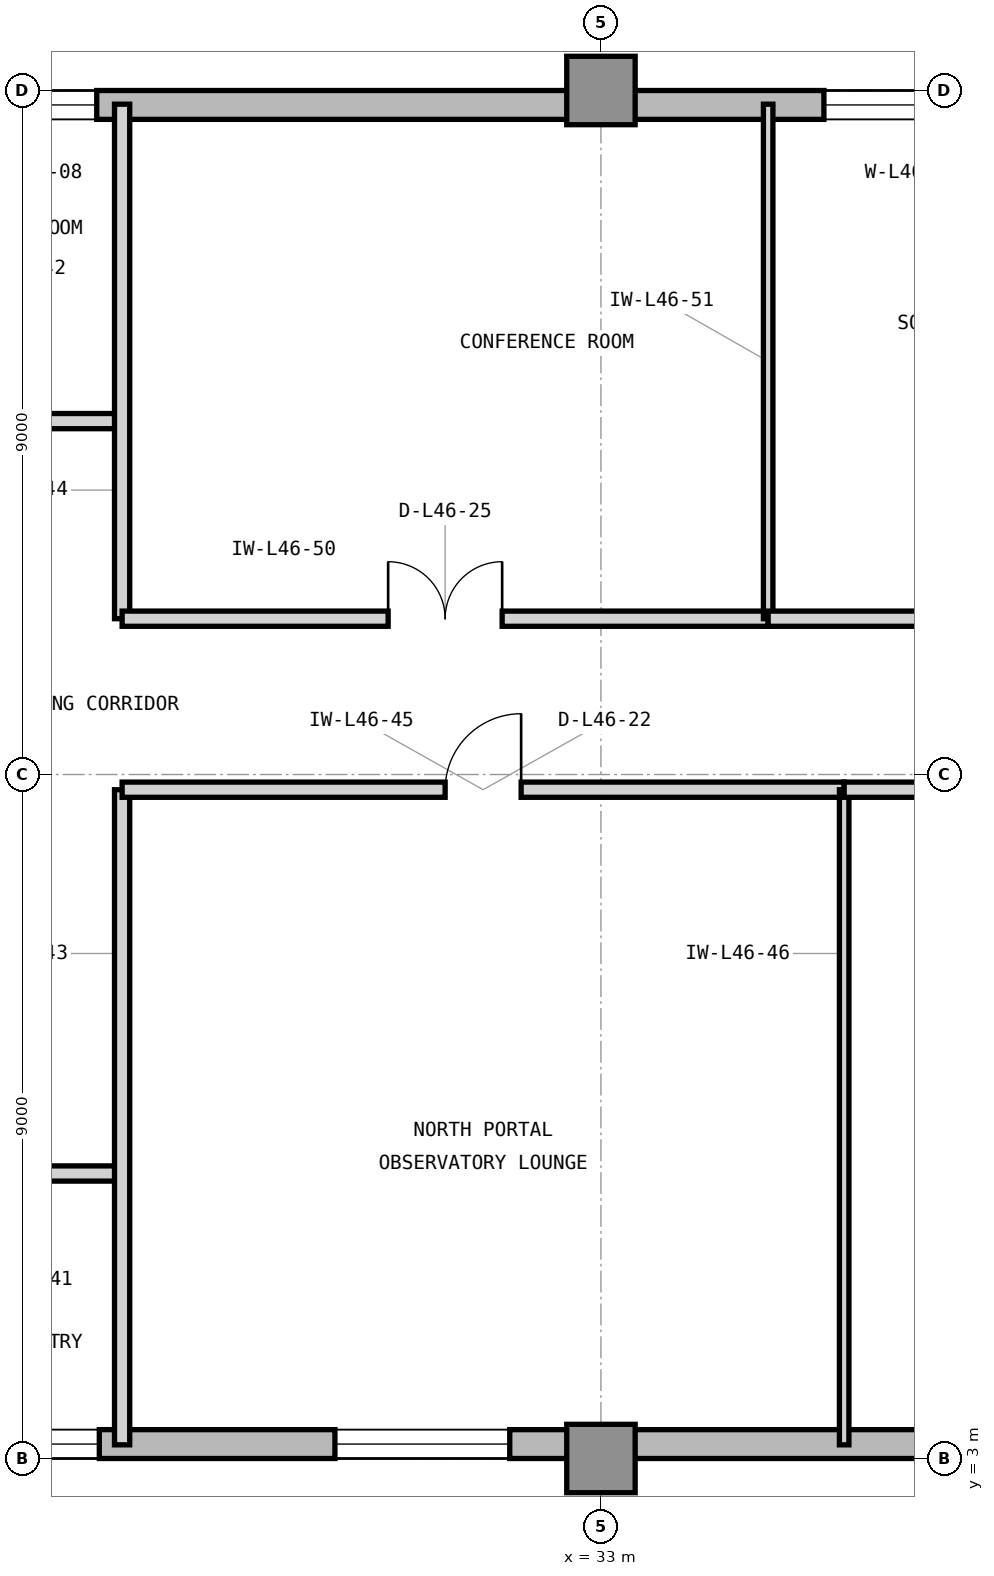
"""IFC4 building model, lengths in metres.
Left out: names, types, materials, properties, quantities, classifications, styles, units other than length and angle.
Written with IfcOpenShell. Run it as: python <this file> out.ifc"""

import sys

from ifc_helpers import new_model, si_unit, direction, frame, frame_2d, origin, origin_2d, place, context, subcontext, project, spatial, rectangle, extrude, element, fill, save


model = new_model("IFC4")
c1 = context("Model", 3, precision=1e-05, world=origin(), true_north=direction((0.0, 1.0)))
c2 = subcontext(c1, "Body", "Model", "MODEL_VIEW")
j1 = project(units=[si_unit("LENGTHUNIT", "METRE"), si_unit("PLANEANGLEUNIT", "RADIAN")], contexts=[c1])
p1 = place(None, origin())
s1 = spatial("IfcSite", under=j1, at=p1, CompositionType="ELEMENT")
p2 = place(p1, origin())
s2 = spatial("IfcBuilding", under=s1, at=p2, CompositionType="ELEMENT")
p3 = place(p2, frame((0.0, 0.0, 191.7)))
s3 = spatial("IfcBuildingStorey", under=s2, at=p3, CompositionType="ELEMENT", Elevation=191.7)
for number, where, z_axis, x_axis in (
    (1, (33.0, 3.0, 0.0), (0.0, 0.0, 1.0), (1.0, 0.0, 0.0)),
    (2, (33.0, 21.0, 0.0), (0.0, 0.0, 1.0), (1.0, 0.0, 0.0)),
):
    element("IfcColumn", number, at=place(p3, frame(where, z_axis=z_axis, x_axis=x_axis)), inside=s3, PredefinedType="COLUMN", context=c2, shape_type="SweptSolid", body=[
        extrude(rectangle(XDim=0.9, YDim=0.9, at=origin_2d()), origin(), (0.0, 0.0, 1.0), 3.9),
    ])
p4 = place(p3, frame((23.9, 3.19, 0.0), z_axis=(0.0, 0.0, 1.0), x_axis=(1.0, 0.0, 0.0)))
e3 = element("IfcWall", 3, at=p4, inside=s3, PredefinedType="STANDARD", context=c2, shape_type="SweptSolid", body=[
    extrude(rectangle(XDim=31.5, YDim=0.38, at=frame_2d((15.75, 0.0))), origin(), (0.0, 0.0, 1.0), 3.7),
])
p5 = place(p4, frame((5.6, 0.0, 0.9)))
e4 = element("IfcOpeningElement", 4, at=p5, cuts=e3, PredefinedType="OPENING", context=c2, shape_type="SweptSolid", body=[
    extrude(rectangle(XDim=2.3, YDim=2.2, at=frame_2d((1.15, 1.1))), frame((0.0, 0.2, 0.0), z_axis=(0.0, -1.0, 0.0), x_axis=(1.0, 0.0, 0.0)), (0.0, 0.0, 1.0), 0.4),
])
p6 = place(p4, frame((14.6, 0.0, 0.9)))
e5 = element("IfcOpeningElement", 5, at=p6, cuts=e3, PredefinedType="OPENING", context=c2, shape_type="SweptSolid", body=[
    extrude(rectangle(XDim=2.3, YDim=2.2, at=frame_2d((1.15, 1.1))), frame((0.0, 0.2, 0.0), z_axis=(0.0, -1.0, 0.0), x_axis=(1.0, 0.0, 0.0)), (0.0, 0.0, 1.0), 0.4),
])
p7 = place(p4, frame((0.9, 0.0, 0.9)))
e6 = element("IfcOpeningElement", 6, at=p7, cuts=e3, PredefinedType="OPENING", context=c2, shape_type="SweptSolid", body=[
    extrude(rectangle(XDim=1.6, YDim=2.2, at=frame_2d((0.8, 1.1))), frame((0.0, 0.2, 0.0), z_axis=(0.0, -1.0, 0.0), x_axis=(1.0, 0.0, 0.0)), (0.0, 0.0, 1.0), 0.4),
])
p8 = place(p4, frame((21.704, 0.0, 0.9)))
e7 = element("IfcOpeningElement", 7, at=p8, cuts=e3, PredefinedType="OPENING", context=c2, shape_type="SweptSolid", body=[
    extrude(rectangle(XDim=1.6, YDim=2.2, at=frame_2d((0.8, 1.1))), frame((0.0, 0.2, 0.0), z_axis=(0.0, -1.0, 0.0), x_axis=(1.0, 0.0, 0.0)), (0.0, 0.0, 1.0), 0.4),
])
p9 = place(p3, frame((55.4, 20.81, 0.0), z_axis=(0.0, 0.0, 1.0), x_axis=(-1.0, 0.0, 0.0)))
e8 = element("IfcWall", 8, at=p9, inside=s3, PredefinedType="STANDARD", context=c2, shape_type="SweptSolid", body=[
    extrude(rectangle(XDim=31.4, YDim=0.38, at=frame_2d((15.7, 0.0))), origin(), (0.0, 0.0, 1.0), 3.7),
])
p10 = place(p9, frame((17.167, 0.0, 0.9)))
e9 = element("IfcOpeningElement", 9, at=p10, cuts=e8, PredefinedType="OPENING", context=c2, shape_type="SweptSolid", body=[
    extrude(rectangle(XDim=2.3, YDim=2.2, at=frame_2d((1.15, 1.1))), frame((0.0, 0.2, 0.0), z_axis=(0.0, -1.0, 0.0), x_axis=(1.0, 0.0, 0.0)), (0.0, 0.0, 1.0), 0.4),
])
p11 = place(p9, frame((29.034, 0.0, 0.9)))
e10 = element("IfcOpeningElement", 10, at=p11, cuts=e8, PredefinedType="OPENING", context=c2, shape_type="SweptSolid", body=[
    extrude(rectangle(XDim=1.6, YDim=2.2, at=frame_2d((0.8, 1.1))), frame((0.0, 0.2, 0.0), z_axis=(0.0, -1.0, 0.0), x_axis=(1.0, 0.0, 0.0)), (0.0, 0.0, 1.0), 0.4),
])
p12 = place(p9, frame((8.354, 0.0, 0.9)))
e11 = element("IfcOpeningElement", 11, at=p12, cuts=e8, PredefinedType="OPENING", context=c2, shape_type="SweptSolid", body=[
    extrude(rectangle(XDim=2.3, YDim=2.2, at=frame_2d((1.15, 1.1))), frame((0.0, 0.2, 0.0), z_axis=(0.0, -1.0, 0.0), x_axis=(1.0, 0.0, 0.0)), (0.0, 0.0, 1.0), 0.4),
])
p13 = place(p3, frame((23.85, 6.75, 0.0), z_axis=(0.0, 0.0, 1.0), x_axis=(1.0, 0.0, 0.0)))
e12 = element("IfcWall", 12, at=p13, inside=s3, PredefinedType="PARTITIONING", context=c2, shape_type="SweptSolid", body=[
    extrude(rectangle(XDim=2.85, YDim=0.2, at=frame_2d((1.425, 0.0))), origin(), (0.0, 0.0, 1.0), 3.69),
])
p14 = place(p13, frame((0.7, 0.0, 0.0)))
e13 = element("IfcOpeningElement", 13, at=p14, cuts=e12, PredefinedType="OPENING", context=c2, shape_type="SweptSolid", body=[
    extrude(rectangle(XDim=1.0, YDim=2.15, at=frame_2d((0.5, 1.075))), frame((0.0, 0.11, 0.0), z_axis=(0.0, -1.0, 0.0), x_axis=(1.0, 0.0, 0.0)), (0.0, 0.0, 1.0), 0.22),
])
p15 = place(p3, frame((23.85, 16.65, 0.0), z_axis=(0.0, 0.0, 1.0), x_axis=(1.0, 0.0, 0.0)))
e14 = element("IfcWall", 14, at=p15, inside=s3, PredefinedType="PARTITIONING", context=c2, shape_type="SweptSolid", body=[
    extrude(rectangle(XDim=2.85, YDim=0.2, at=frame_2d((1.425, 0.0))), origin(), (0.0, 0.0, 1.0), 3.69),
])
p16 = place(p15, frame((0.7, 0.0, 0.0)))
e15 = element("IfcOpeningElement", 15, at=p16, cuts=e14, PredefinedType="OPENING", context=c2, shape_type="SweptSolid", body=[
    extrude(rectangle(XDim=1.0, YDim=2.15, at=frame_2d((0.5, 1.075))), frame((0.0, 0.11, 0.0), z_axis=(0.0, -1.0, 0.0), x_axis=(1.0, 0.0, 0.0)), (0.0, 0.0, 1.0), 0.22),
])
p17 = place(p3, frame((26.7, 3.18, 0.0), z_axis=(0.0, 0.0, 1.0), x_axis=(0.0, 1.0, 0.0)))
e16 = element("IfcWall", 16, at=p17, inside=s3, PredefinedType="PARTITIONING", context=c2, shape_type="SweptSolid", body=[
    extrude(rectangle(XDim=8.62, YDim=0.2, at=frame_2d((4.31, 0.0))), origin(), (0.0, 0.0, 1.0), 3.69),
])
p18 = place(p3, frame((26.7, 14.05, 0.0), z_axis=(0.0, 0.0, 1.0), x_axis=(0.0, 1.0, 0.0)))
e17 = element("IfcWall", 17, at=p18, inside=s3, PredefinedType="PARTITIONING", context=c2, shape_type="SweptSolid", body=[
    extrude(rectangle(XDim=6.77, YDim=0.2, at=frame_2d((3.385, 0.0))), origin(), (0.0, 0.0, 1.0), 3.69),
])
p19 = place(p3, frame((26.7, 11.8, 0.0), z_axis=(0.0, 0.0, 1.0), x_axis=(1.0, 0.0, 0.0)))
e18 = element("IfcWall", 18, at=p19, inside=s3, PredefinedType="PARTITIONING", context=c2, shape_type="SweptSolid", body=[
    extrude(rectangle(XDim=9.5, YDim=0.2, at=frame_2d((4.75, 0.0))), origin(), (0.0, 0.0, 1.0), 3.69),
])
p20 = place(p19, frame((4.25, 0.0, 0.0)))
e19 = element("IfcOpeningElement", 19, at=p20, cuts=e18, PredefinedType="OPENING", context=c2, shape_type="SweptSolid", body=[
    extrude(rectangle(XDim=1.0, YDim=2.15, at=frame_2d((0.5, 1.075))), frame((0.0, 0.11, 0.0), z_axis=(0.0, -1.0, 0.0), x_axis=(1.0, 0.0, 0.0)), (0.0, 0.0, 1.0), 0.22),
])
p21 = place(p3, frame((36.2, 3.18, 0.0), z_axis=(0.0, 0.0, 1.0), x_axis=(0.0, 1.0, 0.0)))
e20 = element("IfcWall", 20, at=p21, inside=s3, PredefinedType="PARTITIONING", context=c2, shape_type="SweptSolid", body=[
    extrude(rectangle(XDim=8.62, YDim=0.125, at=frame_2d((4.31, 0.0))), origin(), (0.0, 0.0, 1.0), 3.69),
])
p22 = place(p3, frame((36.2, 11.8, 0.0), z_axis=(0.0, 0.0, 1.0), x_axis=(1.0, 0.0, 0.0)))
e21 = element("IfcWall", 21, at=p22, inside=s3, PredefinedType="PARTITIONING", context=c2, shape_type="SweptSolid", body=[
    extrude(rectangle(XDim=9.0, YDim=0.2, at=frame_2d((4.5, 0.0))), origin(), (0.0, 0.0, 1.0), 3.69),
])
p23 = place(p22, frame((4.0, 0.0, 0.0)))
e22 = element("IfcOpeningElement", 22, at=p23, cuts=e21, PredefinedType="OPENING", context=c2, shape_type="SweptSolid", body=[
    extrude(rectangle(XDim=1.0, YDim=2.15, at=frame_2d((0.5, 1.075))), frame((0.0, 0.11, 0.0), z_axis=(0.0, -1.0, 0.0), x_axis=(1.0, 0.0, 0.0)), (0.0, 0.0, 1.0), 0.22),
])
p24 = place(p3, frame((26.7, 14.05, 0.0), z_axis=(0.0, 0.0, 1.0), x_axis=(1.0, 0.0, 0.0)))
e23 = element("IfcWall", 23, at=p24, inside=s3, PredefinedType="PARTITIONING", context=c2, shape_type="SweptSolid", body=[
    extrude(rectangle(XDim=8.5, YDim=0.2, at=frame_2d((4.25, 0.0))), origin(), (0.0, 0.0, 1.0), 3.69),
])
p25 = place(p24, frame((3.5, 0.0, 0.0)))
e24 = element("IfcOpeningElement", 24, at=p25, cuts=e23, PredefinedType="OPENING", context=c2, shape_type="SweptSolid", body=[
    extrude(rectangle(XDim=1.5, YDim=2.3, at=frame_2d((0.75, 1.15))), frame((0.0, 0.11, 0.0), z_axis=(0.0, -1.0, 0.0), x_axis=(1.0, 0.0, 0.0)), (0.0, 0.0, 1.0), 0.22),
])
p26 = place(p3, frame((35.2, 14.05, 0.0), z_axis=(0.0, 0.0, 1.0), x_axis=(0.0, 1.0, 0.0)))
e25 = element("IfcWall", 25, at=p26, inside=s3, PredefinedType="PARTITIONING", context=c2, shape_type="SweptSolid", body=[
    extrude(rectangle(XDim=6.77, YDim=0.125, at=frame_2d((3.385, 0.0))), origin(), (0.0, 0.0, 1.0), 3.69),
])
p27 = place(p3, frame((35.2, 14.05, 0.0), z_axis=(0.0, 0.0, 1.0), x_axis=(1.0, 0.0, 0.0)))
e26 = element("IfcWall", 26, at=p27, inside=s3, PredefinedType="PARTITIONING", context=c2, shape_type="SweptSolid", body=[
    extrude(rectangle(XDim=9.0, YDim=0.2, at=frame_2d((4.5, 0.0))), origin(), (0.0, 0.0, 1.0), 3.69),
])
p28 = place(p27, frame((4.0, 0.0, 0.0)))
e27 = element("IfcOpeningElement", 27, at=p28, cuts=e26, PredefinedType="OPENING", context=c2, shape_type="SweptSolid", body=[
    extrude(rectangle(XDim=1.0, YDim=2.15, at=frame_2d((0.5, 1.075))), frame((0.0, 0.11, 0.0), z_axis=(0.0, -1.0, 0.0), x_axis=(1.0, 0.0, 0.0)), (0.0, 0.0, 1.0), 0.22),
])
p29 = place(p5, origin())
e28 = element("IfcWindow", 28, at=p29, inside=s3, PartitioningType="SINGLE_PANEL", PredefinedType="WINDOW", context=c2, shape_type="SweptSolid", body=[
    extrude(rectangle(XDim=2.3, YDim=2.2, at=frame_2d((1.15, 1.1))), frame((0.0, 0.11, 0.0), z_axis=(0.0, -1.0, 0.0), x_axis=(1.0, 0.0, 0.0)), (0.0, 0.0, 1.0), 0.06),
])
fill(e4, e28)
p30 = place(p10, origin())
e29 = element("IfcWindow", 29, at=p30, inside=s3, PartitioningType="SINGLE_PANEL", PredefinedType="WINDOW", context=c2, shape_type="SweptSolid", body=[
    extrude(rectangle(XDim=2.3, YDim=2.2, at=frame_2d((1.15, 1.1))), frame((0.0, 0.11, 0.0), z_axis=(0.0, -1.0, 0.0), x_axis=(1.0, 0.0, 0.0)), (0.0, 0.0, 1.0), 0.06),
])
fill(e9, e29)
p31 = place(p20, origin())
e30 = element("IfcDoor", 30, at=p31, inside=s3, OperationType="SINGLE_SWING_RIGHT", PredefinedType="DOOR", context=c2, shape_type="SweptSolid", body=[
    extrude(rectangle(XDim=1.0, YDim=2.15, at=frame_2d((0.5, 1.075))), frame((0.0, 0.025, 0.0), z_axis=(0.0, -1.0, 0.0), x_axis=(1.0, 0.0, 0.0)), (0.0, 0.0, 1.0), 0.05),
])
fill(e19, e30)
p32 = place(p25, origin())
e31 = element("IfcDoor", 31, at=p32, inside=s3, OperationType="DOUBLE_DOOR_SINGLE_SWING", PredefinedType="DOOR", context=c2, shape_type="SweptSolid", body=[
    extrude(rectangle(XDim=1.5, YDim=2.3, at=frame_2d((0.75, 1.15))), frame((0.0, 0.025, 0.0), z_axis=(0.0, -1.0, 0.0), x_axis=(1.0, 0.0, 0.0)), (0.0, 0.0, 1.0), 0.05),
])
fill(e24, e31)
p33 = place(p7, origin())
e32 = element("IfcWindow", 32, at=p33, inside=s3, PartitioningType="SINGLE_PANEL", PredefinedType="WINDOW", context=c2, shape_type="SweptSolid", body=[
    extrude(rectangle(XDim=1.6, YDim=2.2, at=frame_2d((0.8, 1.1))), frame((0.0, 0.11, 0.0), z_axis=(0.0, -1.0, 0.0), x_axis=(1.0, 0.0, 0.0)), (0.0, 0.0, 1.0), 0.06),
])
fill(e6, e32)
p34 = place(p11, origin())
e33 = element("IfcWindow", 33, at=p34, inside=s3, PartitioningType="SINGLE_PANEL", PredefinedType="WINDOW", context=c2, shape_type="SweptSolid", body=[
    extrude(rectangle(XDim=1.6, YDim=2.2, at=frame_2d((0.8, 1.1))), frame((0.0, 0.11, 0.0), z_axis=(0.0, -1.0, 0.0), x_axis=(1.0, 0.0, 0.0)), (0.0, 0.0, 1.0), 0.06),
])
fill(e10, e33)
save(model, sys.argv[1])
